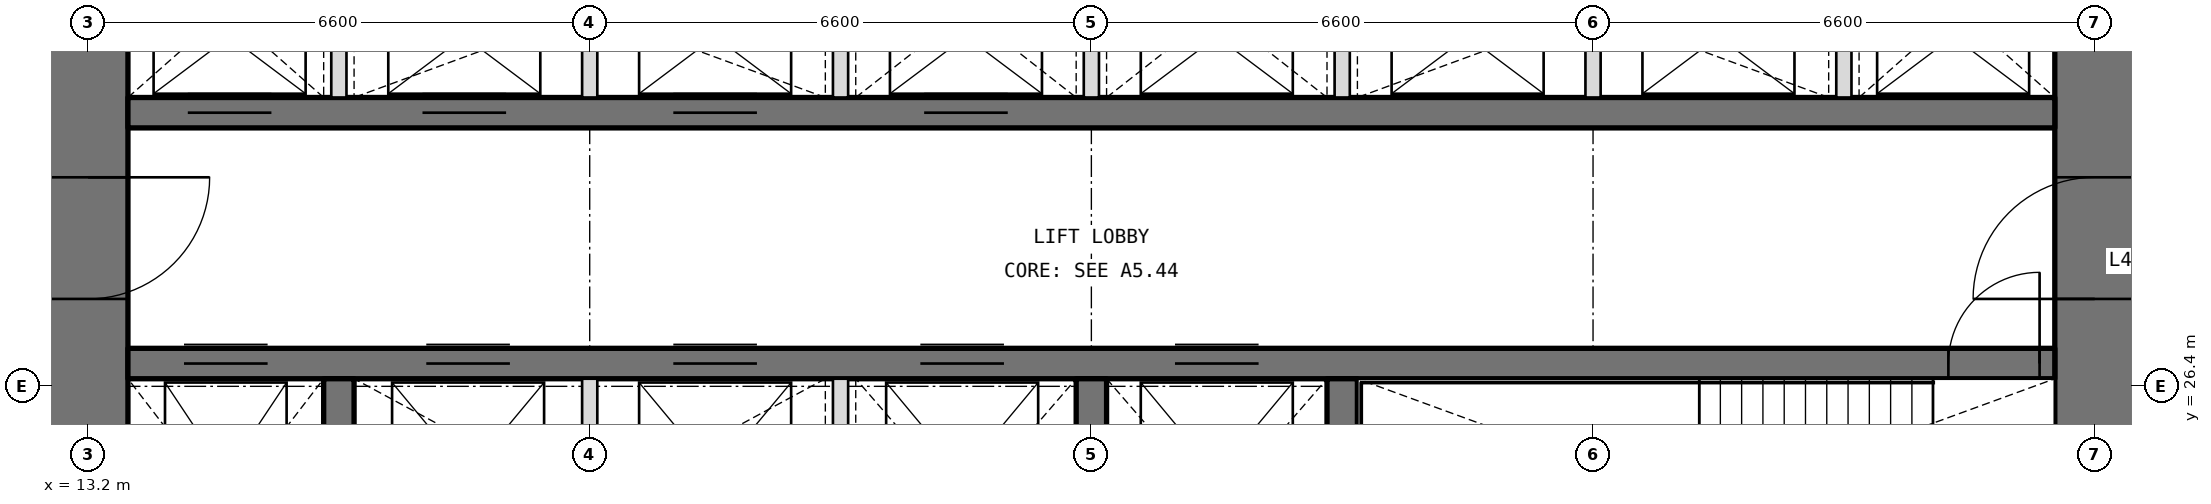
"""IFC4 building model, lengths in metres.
Left out: names, types, materials, properties, quantities, classifications, styles, units other than length and angle.
Written with IfcOpenShell. Run it as: python <this file> out.ifc"""

import sys

from ifc_helpers import new_model, si_unit, direction, frame, frame_2d, origin, place, context, subcontext, project, spatial, rectangle, extrude, element, fill, save


model = new_model("IFC4")
c1 = context("Model", 3, precision=1e-05, world=origin(), true_north=direction((0.0, 1.0)))
c2 = subcontext(c1, "Body", "Model", "MODEL_VIEW")
j1 = project(units=[si_unit("LENGTHUNIT", "METRE"), si_unit("PLANEANGLEUNIT", "RADIAN")], contexts=[c1])
p1 = place(None, origin())
s1 = spatial("IfcSite", under=j1, at=p1, CompositionType="ELEMENT")
p2 = place(p1, origin())
s2 = spatial("IfcBuilding", under=s1, at=p2, CompositionType="ELEMENT")
p3 = place(p2, frame((0.0, 0.0, 185.1)))
s3 = spatial("IfcBuildingStorey", under=s2, at=p3, CompositionType="ELEMENT", Elevation=185.1)
p4 = place(p3, frame((39.6, 13.725, 0.0), z_axis=(0.0, 0.0, 1.0), x_axis=(0.0, 1.0, 0.0)))
e1 = element("IfcWall", 1, at=p4, inside=s3, PredefinedType="SHEAR", context=c2, shape_type="SweptSolid", body=[
    extrude(rectangle(XDim=18.75, YDim=1.05, at=frame_2d((9.375, 0.0))), origin(), (0.0, 0.0, 1.0), 4.2),
])
p5 = place(p4, frame((3.025, 0.0, 0.0)))
e2 = element("IfcOpeningElement", 2, at=p5, cuts=e1, PredefinedType="OPENING", context=c2, shape_type="SweptSolid", body=[
    extrude(rectangle(XDim=1.6, YDim=2.1, at=frame_2d((0.8, 1.05))), frame((0.0, 0.535, 0.0), z_axis=(0.0, -1.0, 0.0), x_axis=(1.0, 0.0, 0.0)), (0.0, 0.0, 1.0), 1.07),
])
p6 = place(p4, frame((13.825, 0.0, 0.0)))
e3 = element("IfcOpeningElement", 3, at=p6, cuts=e1, PredefinedType="OPENING", context=c2, shape_type="SweptSolid", body=[
    extrude(rectangle(XDim=1.6, YDim=2.1, at=frame_2d((0.8, 1.05))), frame((0.0, 0.535, 0.0), z_axis=(0.0, -1.0, 0.0), x_axis=(1.0, 0.0, 0.0)), (0.0, 0.0, 1.0), 1.07),
])
p7 = place(p3, frame((13.2, 32.475, 0.0), z_axis=(0.0, 0.0, 1.0), x_axis=(0.0, -1.0, 0.0)))
e4 = element("IfcWall", 4, at=p7, inside=s3, PredefinedType="SHEAR", context=c2, shape_type="SweptSolid", body=[
    extrude(rectangle(XDim=18.75, YDim=1.05, at=frame_2d((9.375, 0.0))), origin(), (0.0, 0.0, 1.0), 4.2),
])
p8 = place(p7, frame((14.125, 0.0, 0.0)))
e5 = element("IfcOpeningElement", 5, at=p8, cuts=e4, PredefinedType="OPENING", context=c2, shape_type="SweptSolid", body=[
    extrude(rectangle(XDim=1.6, YDim=2.1, at=frame_2d((0.8, 1.05))), frame((0.0, 0.535, 0.0), z_axis=(0.0, -1.0, 0.0), x_axis=(1.0, 0.0, 0.0)), (0.0, 0.0, 1.0), 1.07),
])
p9 = place(p7, frame((3.325, 0.0, 0.0)))
e6 = element("IfcOpeningElement", 6, at=p9, cuts=e4, PredefinedType="OPENING", context=c2, shape_type="SweptSolid", body=[
    extrude(rectangle(XDim=1.6, YDim=2.1, at=frame_2d((0.8, 1.05))), frame((0.0, 0.535, 0.0), z_axis=(0.0, -1.0, 0.0), x_axis=(1.0, 0.0, 0.0)), (0.0, 0.0, 1.0), 1.07),
])
p10 = place(p3, frame((13.725, 26.7, 0.0), z_axis=(0.0, 0.0, 1.0), x_axis=(1.0, 0.0, 0.0)))
e7 = element("IfcWall", 7, at=p10, inside=s3, PredefinedType="SHEAR", context=c2, shape_type="SweptSolid", body=[
    extrude(rectangle(XDim=25.35, YDim=0.4, at=frame_2d((12.675, 0.0))), origin(), (0.0, 0.0, 1.0), 4.2),
])
p11 = place(p10, frame((23.95, 0.0, 0.0)))
e8 = element("IfcOpeningElement", 8, at=p11, cuts=e7, PredefinedType="OPENING", context=c2, shape_type="SweptSolid", body=[
    extrude(rectangle(XDim=1.2, YDim=2.1, at=frame_2d((0.6, 1.05))), frame((0.0, 0.21, 0.0), z_axis=(0.0, -1.0, 0.0), x_axis=(1.0, 0.0, 0.0)), (0.0, 0.0, 1.0), 0.42),
])
p12 = place(p10, frame((0.738, 0.0, 0.0)))
e9 = element("IfcOpeningElement", 9, at=p12, cuts=e7, PredefinedType="OPENING", context=c2, shape_type="SweptSolid", body=[
    extrude(rectangle(XDim=1.1, YDim=2.1, at=frame_2d((0.55, 1.05))), frame((0.0, 0.21, 0.0), z_axis=(0.0, -1.0, 0.0), x_axis=(1.0, 0.0, 0.0)), (0.0, 0.0, 1.0), 0.42),
])
p13 = place(p10, frame((3.925, 0.0, 0.0)))
e10 = element("IfcOpeningElement", 10, at=p13, cuts=e7, PredefinedType="OPENING", context=c2, shape_type="SweptSolid", body=[
    extrude(rectangle(XDim=1.1, YDim=2.1, at=frame_2d((0.55, 1.05))), frame((0.0, 0.21, 0.0), z_axis=(0.0, -1.0, 0.0), x_axis=(1.0, 0.0, 0.0)), (0.0, 0.0, 1.0), 0.42),
])
p14 = place(p10, frame((7.175, 0.0, 0.0)))
e11 = element("IfcOpeningElement", 11, at=p14, cuts=e7, PredefinedType="OPENING", context=c2, shape_type="SweptSolid", body=[
    extrude(rectangle(XDim=1.1, YDim=2.1, at=frame_2d((0.55, 1.05))), frame((0.0, 0.21, 0.0), z_axis=(0.0, -1.0, 0.0), x_axis=(1.0, 0.0, 0.0)), (0.0, 0.0, 1.0), 0.42),
])
p15 = place(p10, frame((10.425, 0.0, 0.0)))
e12 = element("IfcOpeningElement", 12, at=p15, cuts=e7, PredefinedType="OPENING", context=c2, shape_type="SweptSolid", body=[
    extrude(rectangle(XDim=1.1, YDim=2.1, at=frame_2d((0.55, 1.05))), frame((0.0, 0.21, 0.0), z_axis=(0.0, -1.0, 0.0), x_axis=(1.0, 0.0, 0.0)), (0.0, 0.0, 1.0), 0.42),
])
p16 = place(p10, frame((13.775, 0.0, 0.0)))
e13 = element("IfcOpeningElement", 13, at=p16, cuts=e7, PredefinedType="OPENING", context=c2, shape_type="SweptSolid", body=[
    extrude(rectangle(XDim=1.1, YDim=2.1, at=frame_2d((0.55, 1.05))), frame((0.0, 0.21, 0.0), z_axis=(0.0, -1.0, 0.0), x_axis=(1.0, 0.0, 0.0)), (0.0, 0.0, 1.0), 0.42),
])
p17 = place(p3, frame((13.725, 30.0, 0.0), z_axis=(0.0, 0.0, 1.0), x_axis=(1.0, 0.0, 0.0)))
e14 = element("IfcWall", 14, at=p17, inside=s3, PredefinedType="SHEAR", context=c2, shape_type="SweptSolid", body=[
    extrude(rectangle(XDim=25.35, YDim=0.4, at=frame_2d((12.675, 0.0))), origin(), (0.0, 0.0, 1.0), 4.2),
])
p18 = place(p17, frame((0.788, 0.0, 0.0)))
e15 = element("IfcOpeningElement", 15, at=p18, cuts=e14, PredefinedType="OPENING", context=c2, shape_type="SweptSolid", body=[
    extrude(rectangle(XDim=1.1, YDim=2.1, at=frame_2d((0.55, 1.05))), frame((0.0, 0.21, 0.0), z_axis=(0.0, -1.0, 0.0), x_axis=(1.0, 0.0, 0.0)), (0.0, 0.0, 1.0), 0.42),
])
p19 = place(p17, frame((3.875, 0.0, 0.0)))
e16 = element("IfcOpeningElement", 16, at=p19, cuts=e14, PredefinedType="OPENING", context=c2, shape_type="SweptSolid", body=[
    extrude(rectangle(XDim=1.1, YDim=2.1, at=frame_2d((0.55, 1.05))), frame((0.0, 0.21, 0.0), z_axis=(0.0, -1.0, 0.0), x_axis=(1.0, 0.0, 0.0)), (0.0, 0.0, 1.0), 0.42),
])
p20 = place(p17, frame((7.175, 0.0, 0.0)))
e17 = element("IfcOpeningElement", 17, at=p20, cuts=e14, PredefinedType="OPENING", context=c2, shape_type="SweptSolid", body=[
    extrude(rectangle(XDim=1.1, YDim=2.1, at=frame_2d((0.55, 1.05))), frame((0.0, 0.21, 0.0), z_axis=(0.0, -1.0, 0.0), x_axis=(1.0, 0.0, 0.0)), (0.0, 0.0, 1.0), 0.42),
])
p21 = place(p17, frame((10.475, 0.0, 0.0)))
e18 = element("IfcOpeningElement", 18, at=p21, cuts=e14, PredefinedType="OPENING", context=c2, shape_type="SweptSolid", body=[
    extrude(rectangle(XDim=1.1, YDim=2.1, at=frame_2d((0.55, 1.05))), frame((0.0, 0.21, 0.0), z_axis=(0.0, -1.0, 0.0), x_axis=(1.0, 0.0, 0.0)), (0.0, 0.0, 1.0), 0.42),
])
for number, where, z_axis, x_axis in (
    (19, (16.5, 23.15, 0.0), (0.0, 0.0, 1.0), (0.0, 1.0, 0.0)),
    (20, (26.4, 23.15, 0.0), (0.0, 0.0, 1.0), (0.0, 1.0, 0.0)),
    (21, (29.7, 23.15, 0.0), (0.0, 0.0, 1.0), (0.0, 1.0, 0.0)),
):
    element("IfcWall", number, at=place(p3, frame(where, z_axis=z_axis, x_axis=x_axis)), inside=s3, PredefinedType="SHEAR", context=c2, shape_type="SweptSolid", body=[
        extrude(rectangle(XDim=3.35, YDim=0.4, at=frame_2d((1.675, 0.0))), origin(), (0.0, 0.0, 1.0), 4.2),
    ])
for number, where, z_axis, x_axis in (
    (22, (16.5, 30.2, 0.0), (0.0, 0.0, 1.0), (0.0, 1.0, 0.0)),
    (23, (19.8, 30.2, 0.0), (0.0, 0.0, 1.0), (0.0, 1.0, 0.0)),
    (24, (23.1, 30.2, 0.0), (0.0, 0.0, 1.0), (0.0, 1.0, 0.0)),
    (25, (26.4, 30.2, 0.0), (0.0, 0.0, 1.0), (0.0, 1.0, 0.0)),
    (26, (29.7, 30.2, 0.0), (0.0, 0.0, 1.0), (0.0, 1.0, 0.0)),
    (27, (33.0, 30.2, 0.0), (0.0, 0.0, 1.0), (0.0, 1.0, 0.0)),
    (28, (36.3, 30.2, 0.0), (0.0, 0.0, 1.0), (0.0, 1.0, 0.0)),
):
    element("IfcWall", number, at=place(p3, frame(where, z_axis=z_axis, x_axis=x_axis)), inside=s3, PredefinedType="PARTITIONING", context=c2, shape_type="SweptSolid", body=[
        extrude(rectangle(XDim=2.275, YDim=0.2, at=frame_2d((1.138, 0.0))), origin(), (0.0, 0.0, 1.0), 4.2),
    ])
for number, where, z_axis, x_axis in (
    (29, (19.8, 23.15, 0.0), (0.0, 0.0, 1.0), (0.0, 1.0, 0.0)),
    (30, (23.1, 23.15, 0.0), (0.0, 0.0, 1.0), (0.0, 1.0, 0.0)),
):
    element("IfcWall", number, at=place(p3, frame(where, z_axis=z_axis, x_axis=x_axis)), inside=s3, PredefinedType="PARTITIONING", context=c2, shape_type="SweptSolid", body=[
        extrude(rectangle(XDim=3.35, YDim=0.2, at=frame_2d((1.675, 0.0))), origin(), (0.0, 0.0, 1.0), 4.2),
    ])
p22 = place(p11, origin())
e31 = element("IfcDoor", 31, at=p22, inside=s3, OperationType="SINGLE_SWING_RIGHT", PredefinedType="DOOR", context=c2, shape_type="SweptSolid", body=[
    extrude(rectangle(XDim=1.2, YDim=2.1, at=frame_2d((0.6, 1.05))), frame((0.0, 0.025, 0.0), z_axis=(0.0, -1.0, 0.0), x_axis=(1.0, 0.0, 0.0)), (0.0, 0.0, 1.0), 0.05),
])
fill(e8, e31)
p23 = place(p9, origin())
e32 = element("IfcDoor", 32, at=p23, inside=s3, OperationType="DOUBLE_DOOR_DOUBLE_SWING", PredefinedType="DOOR", context=c2, shape_type="SweptSolid", body=[
    extrude(rectangle(XDim=1.6, YDim=2.1, at=frame_2d((0.8, 1.05))), frame((0.0, 0.025, 0.0), z_axis=(0.0, -1.0, 0.0), x_axis=(1.0, 0.0, 0.0)), (0.0, 0.0, 1.0), 0.05),
])
fill(e6, e32)
p24 = place(p6, origin())
e33 = element("IfcDoor", 33, at=p24, inside=s3, OperationType="DOUBLE_DOOR_DOUBLE_SWING", PredefinedType="DOOR", context=c2, shape_type="SweptSolid", body=[
    extrude(rectangle(XDim=1.6, YDim=2.1, at=frame_2d((0.8, 1.05))), frame((0.0, 0.025, 0.0), z_axis=(0.0, -1.0, 0.0), x_axis=(1.0, 0.0, 0.0)), (0.0, 0.0, 1.0), 0.05),
])
fill(e3, e33)
p25 = place(p18, origin())
e34 = element("IfcDoor", 34, at=p25, inside=s3, OperationType="DOUBLE_DOOR_SLIDING", PredefinedType="DOOR", context=c2, shape_type="SweptSolid", body=[
    extrude(rectangle(XDim=1.1, YDim=2.1, at=frame_2d((0.55, 1.05))), frame((0.0, 0.025, 0.0), z_axis=(0.0, -1.0, 0.0), x_axis=(1.0, 0.0, 0.0)), (0.0, 0.0, 1.0), 0.05),
])
fill(e15, e34)
p26 = place(p19, origin())
e35 = element("IfcDoor", 35, at=p26, inside=s3, OperationType="DOUBLE_DOOR_SLIDING", PredefinedType="DOOR", context=c2, shape_type="SweptSolid", body=[
    extrude(rectangle(XDim=1.1, YDim=2.1, at=frame_2d((0.55, 1.05))), frame((0.0, 0.025, 0.0), z_axis=(0.0, -1.0, 0.0), x_axis=(1.0, 0.0, 0.0)), (0.0, 0.0, 1.0), 0.05),
])
fill(e16, e35)
p27 = place(p20, origin())
e36 = element("IfcDoor", 36, at=p27, inside=s3, OperationType="DOUBLE_DOOR_SLIDING", PredefinedType="DOOR", context=c2, shape_type="SweptSolid", body=[
    extrude(rectangle(XDim=1.1, YDim=2.1, at=frame_2d((0.55, 1.05))), frame((0.0, 0.025, 0.0), z_axis=(0.0, -1.0, 0.0), x_axis=(1.0, 0.0, 0.0)), (0.0, 0.0, 1.0), 0.05),
])
fill(e17, e36)
p28 = place(p21, origin())
e37 = element("IfcDoor", 37, at=p28, inside=s3, OperationType="DOUBLE_DOOR_SLIDING", PredefinedType="DOOR", context=c2, shape_type="SweptSolid", body=[
    extrude(rectangle(XDim=1.1, YDim=2.1, at=frame_2d((0.55, 1.05))), frame((0.0, 0.025, 0.0), z_axis=(0.0, -1.0, 0.0), x_axis=(1.0, 0.0, 0.0)), (0.0, 0.0, 1.0), 0.05),
])
fill(e18, e37)
p29 = place(p12, origin())
e38 = element("IfcDoor", 38, at=p29, inside=s3, OperationType="DOUBLE_DOOR_SLIDING", PredefinedType="DOOR", context=c2, shape_type="SweptSolid", body=[
    extrude(rectangle(XDim=1.1, YDim=2.1, at=frame_2d((0.55, 1.05))), frame((0.0, 0.025, 0.0), z_axis=(0.0, -1.0, 0.0), x_axis=(1.0, 0.0, 0.0)), (0.0, 0.0, 1.0), 0.05),
])
fill(e9, e38)
p30 = place(p13, origin())
e39 = element("IfcDoor", 39, at=p30, inside=s3, OperationType="DOUBLE_DOOR_SLIDING", PredefinedType="DOOR", context=c2, shape_type="SweptSolid", body=[
    extrude(rectangle(XDim=1.1, YDim=2.1, at=frame_2d((0.55, 1.05))), frame((0.0, 0.025, 0.0), z_axis=(0.0, -1.0, 0.0), x_axis=(1.0, 0.0, 0.0)), (0.0, 0.0, 1.0), 0.05),
])
fill(e10, e39)
p31 = place(p14, origin())
e40 = element("IfcDoor", 40, at=p31, inside=s3, OperationType="DOUBLE_DOOR_SLIDING", PredefinedType="DOOR", context=c2, shape_type="SweptSolid", body=[
    extrude(rectangle(XDim=1.1, YDim=2.1, at=frame_2d((0.55, 1.05))), frame((0.0, 0.025, 0.0), z_axis=(0.0, -1.0, 0.0), x_axis=(1.0, 0.0, 0.0)), (0.0, 0.0, 1.0), 0.05),
])
fill(e11, e40)
p32 = place(p15, origin())
e41 = element("IfcDoor", 41, at=p32, inside=s3, OperationType="DOUBLE_DOOR_SLIDING", PredefinedType="DOOR", context=c2, shape_type="SweptSolid", body=[
    extrude(rectangle(XDim=1.1, YDim=2.1, at=frame_2d((0.55, 1.05))), frame((0.0, 0.025, 0.0), z_axis=(0.0, -1.0, 0.0), x_axis=(1.0, 0.0, 0.0)), (0.0, 0.0, 1.0), 0.05),
])
fill(e12, e41)
p33 = place(p16, origin())
e42 = element("IfcDoor", 42, at=p33, inside=s3, OperationType="DOUBLE_DOOR_SLIDING", PredefinedType="DOOR", context=c2, shape_type="SweptSolid", body=[
    extrude(rectangle(XDim=1.1, YDim=2.1, at=frame_2d((0.55, 1.05))), frame((0.0, 0.025, 0.0), z_axis=(0.0, -1.0, 0.0), x_axis=(1.0, 0.0, 0.0)), (0.0, 0.0, 1.0), 0.05),
])
fill(e13, e42)
save(model, sys.argv[1])
